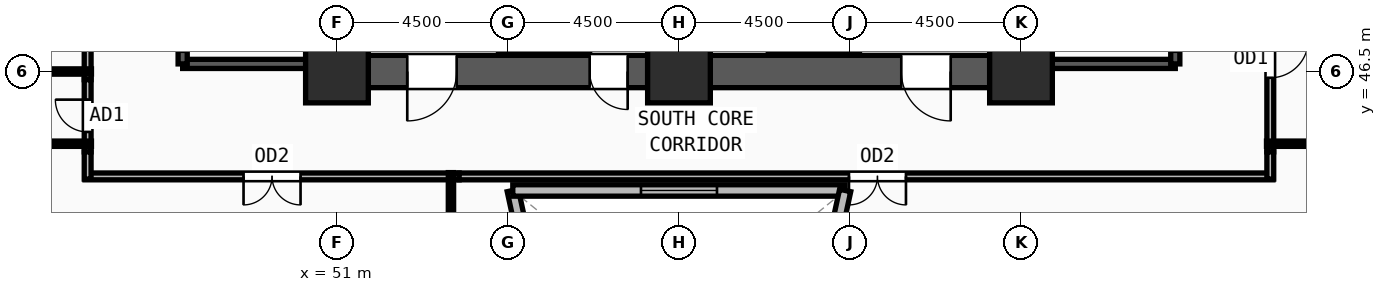
"""IFC4 building model, lengths in metres.
Left out: names, types, materials, properties, quantities, classifications, styles, units other than length and angle.
Written with IfcOpenShell. Run it as: python <this file> out.ifc"""

import sys

from ifc_helpers import new_model, si_unit, direction, frame, frame_2d, origin, origin_2d, place, context, subcontext, project, spatial, rectangle, extrude, source, transform, mapped, element, fill, save


model = new_model("IFC4")
c1 = context("Model", 3, precision=1e-05, world=origin(), true_north=direction((0.0, 1.0)))
c2 = subcontext(c1, "Body", "Model", "MODEL_VIEW")
j1 = project(units=[si_unit("LENGTHUNIT", "METRE"), si_unit("PLANEANGLEUNIT", "RADIAN")], contexts=[c1])
p1 = place(None, origin())
s1 = spatial("IfcSite", under=j1, at=p1, CompositionType="ELEMENT")
p2 = place(p1, origin())
s2 = spatial("IfcBuilding", under=s1, at=p2, CompositionType="ELEMENT")
p3 = place(p2, frame((0.0, 0.0, 39.75)))
s3 = spatial("IfcBuildingStorey", under=s2, at=p3, CompositionType="ELEMENT", Elevation=39.75)
m1 = source(origin(), c2, "Body", "SweptSolid", [
    extrude(rectangle(XDim=1.65, YDim=1.65, at=origin_2d()), origin(), (0.0, 0.0, 1.0), 3.75),
])
for number, where, z_axis, x_axis in (
    (1, (51.0, 46.5, 0.0), (0.0, 0.0, 1.0), (1.0, 0.0, 0.0)),
    (2, (60.0, 46.5, 0.0), (0.0, 0.0, 1.0), (1.0, 0.0, 0.0)),
    (3, (69.0, 46.5, 0.0), (0.0, 0.0, 1.0), (1.0, 0.0, 0.0)),
):
    element("IfcColumn", number, at=place(p3, frame(where, z_axis=z_axis, x_axis=x_axis)), inside=s3, PredefinedType="COLUMN", context=c2, shape_type="MappedRepresentation", body=[
        mapped(m1, transform((0.0, 0.0, 0.0), x_axis=(1.0, 0.0, 0.0), y_axis=(0.0, 1.0, 0.0), z_axis=(0.0, 0.0, 1.0), scale=1.0)),
    ])
p4 = place(p3, frame((68.175, 46.5, 0.0), z_axis=(0.0, 0.0, 1.0), x_axis=(-1.0, 0.0, 0.0)))
e4 = element("IfcWall", 4, at=p4, inside=s3, PredefinedType="SHEAR", context=c2, shape_type="SweptSolid", body=[
    extrude(rectangle(XDim=7.35, YDim=0.85, at=frame_2d((3.675, 0.0))), origin(), (0.0, 0.0, 1.0), 3.57),
])
m2 = source(origin(), c2, "Body", "SweptSolid", [
    extrude(rectangle(XDim=1.3, YDim=2.2, at=frame_2d((0.65, 1.1))), frame((0.0, 0.435, 0.0), z_axis=(0.0, -1.0, 0.0), x_axis=(1.0, 0.0, 0.0)), (0.0, 0.0, 1.0), 0.87),
])
p5 = place(p4, frame((1.025, 0.0, 0.0)))
e5 = element("IfcOpeningElement", 5, at=p5, cuts=e4, PredefinedType="OPENING", context=c2, shape_type="MappedRepresentation", body=[
    mapped(m2, transform((0.0, 0.0, 0.0), x_axis=(1.0, 0.0, 0.0), y_axis=(0.0, 1.0, 0.0), z_axis=(0.0, 0.0, 1.0), scale=1.0)),
])
p6 = place(p3, frame((59.175, 46.5, 0.0), z_axis=(0.0, 0.0, 1.0), x_axis=(-1.0, 0.0, 0.0)))
e6 = element("IfcWall", 6, at=p6, inside=s3, PredefinedType="SHEAR", context=c2, shape_type="SweptSolid", body=[
    extrude(rectangle(XDim=7.35, YDim=0.85, at=frame_2d((3.675, 0.0))), origin(), (0.0, 0.0, 1.0), 3.57),
])
p7 = place(p6, frame((5.025, 0.0, 0.0)))
e7 = element("IfcOpeningElement", 7, at=p7, cuts=e6, PredefinedType="OPENING", context=c2, shape_type="MappedRepresentation", body=[
    mapped(m2, transform((0.0, 0.0, 0.0), x_axis=(1.0, 0.0, 0.0), y_axis=(0.0, 1.0, 0.0), z_axis=(0.0, 0.0, 1.0), scale=1.0)),
])
m3 = source(origin(), c2, "Body", "SweptSolid", [
    extrude(rectangle(XDim=1.0, YDim=2.2, at=frame_2d((0.5, 1.1))), frame((0.0, 0.435, 0.0), z_axis=(0.0, -1.0, 0.0), x_axis=(1.0, 0.0, 0.0)), (0.0, 0.0, 1.0), 0.87),
])
p8 = place(p6, frame((0.525, 0.0, 0.0)))
e8 = element("IfcOpeningElement", 8, at=p8, cuts=e6, PredefinedType="OPENING", context=c2, shape_type="MappedRepresentation", body=[
    mapped(m3, transform((0.0, 0.0, 0.0), x_axis=(1.0, 0.0, 0.0), y_axis=(0.0, 1.0, 0.0), z_axis=(0.0, 0.0, 1.0), scale=1.0)),
])
p9 = place(p3, frame((46.94, 46.7, 0.0), z_axis=(0.0, 0.0, 1.0), x_axis=(1.0, 0.0, 0.0)))
e9 = element("IfcWall", 9, at=p9, inside=s3, PredefinedType="SOLIDWALL", context=c2, shape_type="SweptSolid", body=[
    extrude(rectangle(XDim=3.44, YDim=0.24, at=frame_2d((1.72, 0.0))), origin(), (0.0, 0.0, 1.0), 3.57),
])
p10 = place(p3, frame((50.38, 46.7, 0.0), z_axis=(0.0, 0.0, 1.0), x_axis=(0.0, 1.0, 0.0)))
e10 = element("IfcWall", 10, at=p10, inside=s3, PredefinedType="SOLIDWALL", context=c2, shape_type="SweptSolid", body=[
    extrude(rectangle(XDim=7.82, YDim=0.24, at=frame_2d((3.91, 0.0))), origin(), (0.0, 0.0, 1.0), 3.57),
])
p11 = place(p3, frame((46.94, 54.52, 0.0), z_axis=(0.0, 0.0, 1.0), x_axis=(0.0, -1.0, 0.0)))
e11 = element("IfcWall", 11, at=p11, inside=s3, PredefinedType="SOLIDWALL", context=c2, shape_type="SweptSolid", body=[
    extrude(rectangle(XDim=7.82, YDim=0.24, at=frame_2d((3.91, 0.0))), origin(), (0.0, 0.0, 1.0), 3.57),
])
m4 = source(origin(), c2, "Body", "SweptSolid", [
    extrude(rectangle(XDim=1.2, YDim=2.2, at=frame_2d((0.6, 1.1))), frame((0.0, 0.13, 0.0), z_axis=(0.0, -1.0, 0.0), x_axis=(1.0, 0.0, 0.0)), (0.0, 0.0, 1.0), 0.26),
])
p12 = place(p11, frame((6.3, 0.0, 0.0)))
e12 = element("IfcOpeningElement", 12, at=p12, cuts=e11, PredefinedType="OPENING", context=c2, shape_type="MappedRepresentation", body=[
    mapped(m4, transform((0.0, 0.0, 0.0), x_axis=(1.0, 0.0, 0.0), y_axis=(0.0, 1.0, 0.0), z_axis=(0.0, 0.0, 1.0), scale=1.0)),
])
p13 = place(p3, frame((69.62, 46.7, 0.0), z_axis=(0.0, 0.0, 1.0), x_axis=(1.0, 0.0, 0.0)))
e13 = element("IfcWall", 13, at=p13, inside=s3, PredefinedType="SOLIDWALL", context=c2, shape_type="SweptSolid", body=[
    extrude(rectangle(XDim=3.44, YDim=0.24, at=frame_2d((1.72, 0.0))), origin(), (0.0, 0.0, 1.0), 3.57),
])
p14 = place(p3, frame((73.06, 46.7, 0.0), z_axis=(0.0, 0.0, 1.0), x_axis=(0.0, 1.0, 0.0)))
e14 = element("IfcWall", 14, at=p14, inside=s3, PredefinedType="SOLIDWALL", context=c2, shape_type="SweptSolid", body=[
    extrude(rectangle(XDim=7.82, YDim=0.24, at=frame_2d((3.91, 0.0))), origin(), (0.0, 0.0, 1.0), 3.57),
])
p15 = place(p14, frame((0.32, 0.0, 0.0)))
e15 = element("IfcOpeningElement", 15, at=p15, cuts=e14, PredefinedType="OPENING", context=c2, shape_type="MappedRepresentation", body=[
    mapped(m4, transform((0.0, 0.0, 0.0), x_axis=(1.0, 0.0, 0.0), y_axis=(0.0, 1.0, 0.0), z_axis=(0.0, 0.0, 1.0), scale=1.0)),
])
p16 = place(p3, frame((69.62, 54.52, 0.0), z_axis=(0.0, 0.0, 1.0), x_axis=(0.0, -1.0, 0.0)))
e16 = element("IfcWall", 16, at=p16, inside=s3, PredefinedType="SOLIDWALL", context=c2, shape_type="SweptSolid", body=[
    extrude(rectangle(XDim=7.82, YDim=0.24, at=frame_2d((3.91, 0.0))), origin(), (0.0, 0.0, 1.0), 3.57),
])
p17 = place(p3, frame((57.158, 36.291, 0.0), z_axis=(0.0, 0.0, 1.0), x_axis=(-0.211384142555, 0.977403061319, 0.0)))
e17 = element("IfcWall", 17, at=p17, inside=s3, PredefinedType="SOLIDWALL", context=c2, shape_type="SweptSolid", body=[
    extrude(rectangle(XDim=7.243, YDim=0.3, at=frame_2d((3.621, 0.0))), origin(), (0.0, 0.0, 1.0), 3.57),
])
m5 = source(origin(), c2, "Body", "SweptSolid", [
    extrude(rectangle(XDim=2.0, YDim=1.9, at=frame_2d((1.0, 0.95))), frame((0.0, 0.16, 0.0), z_axis=(0.0, -1.0, 0.0), x_axis=(1.0, 0.0, 0.0)), (0.0, 0.0, 1.0), 0.32),
])
p18 = place(p17, frame((2.621, 0.0, 0.55)))
e18 = element("IfcOpeningElement", 18, at=p18, cuts=e17, PredefinedType="OPENING", context=c2, shape_type="MappedRepresentation", body=[
    mapped(m5, transform((0.0, 0.0, 0.0), x_axis=(1.0, 0.0, 0.0), y_axis=(0.0, 1.0, 0.0), z_axis=(0.0, 0.0, 1.0), scale=1.0)),
])
p19 = place(p3, frame((55.627, 43.37, 0.0), z_axis=(0.0, 0.0, 1.0), x_axis=(1.0, 0.0, 0.0)))
e19 = element("IfcWall", 19, at=p19, inside=s3, PredefinedType="SOLIDWALL", context=c2, shape_type="SweptSolid", body=[
    extrude(rectangle(XDim=8.746, YDim=0.3, at=frame_2d((4.373, 0.0))), origin(), (0.0, 0.0, 1.0), 3.57),
])
p20 = place(p19, frame((3.373, 0.0, 0.55)))
e20 = element("IfcOpeningElement", 20, at=p20, cuts=e19, PredefinedType="OPENING", context=c2, shape_type="MappedRepresentation", body=[
    mapped(m5, transform((0.0, 0.0, 0.0), x_axis=(1.0, 0.0, 0.0), y_axis=(0.0, 1.0, 0.0), z_axis=(0.0, 0.0, 1.0), scale=1.0)),
])
p21 = place(p3, frame((64.373, 43.37, 0.0), z_axis=(0.0, 0.0, 1.0), x_axis=(-0.211384142555, -0.977403061319, 0.0)))
e21 = element("IfcWall", 21, at=p21, inside=s3, PredefinedType="SOLIDWALL", context=c2, shape_type="SweptSolid", body=[
    extrude(rectangle(XDim=7.243, YDim=0.3, at=frame_2d((3.621, 0.0))), origin(), (0.0, 0.0, 1.0), 3.57),
])
p22 = place(p21, frame((2.621, 0.0, 0.55)))
e22 = element("IfcOpeningElement", 22, at=p22, cuts=e21, PredefinedType="OPENING", context=c2, shape_type="MappedRepresentation", body=[
    mapped(m5, transform((0.0, 0.0, 0.0), x_axis=(1.0, 0.0, 0.0), y_axis=(0.0, 1.0, 0.0), z_axis=(0.0, 0.0, 1.0), scale=1.0)),
])
p23 = place(p3, frame((44.44, 46.285, 0.0), z_axis=(0.0, 0.0, 1.0), x_axis=(0.0, 1.0, 0.0)))
e23 = element("IfcWall", 23, at=p23, inside=s3, PredefinedType="PARTITIONING", context=c2, shape_type="SweptSolid", body=[
    extrude(rectangle(XDim=8.5, YDim=0.18, at=frame_2d((4.25, 0.0))), origin(), (0.0, 0.0, 1.0), 3.57),
])
m6 = source(origin(), c2, "Body", "SweptSolid", [
    extrude(rectangle(XDim=1.5, YDim=2.2, at=frame_2d((0.75, 1.1))), frame((0.0, 0.1, 0.0), z_axis=(0.0, -1.0, 0.0), x_axis=(1.0, 0.0, 0.0)), (0.0, 0.0, 1.0), 0.2),
])
p24 = place(p23, frame((3.5, 0.0, 0.0)))
e24 = element("IfcOpeningElement", 24, at=p24, cuts=e23, PredefinedType="OPENING", context=c2, shape_type="MappedRepresentation", body=[
    mapped(m6, transform((0.0, 0.0, 0.0), x_axis=(1.0, 0.0, 0.0), y_axis=(0.0, 1.0, 0.0), z_axis=(0.0, 0.0, 1.0), scale=1.0)),
])
p25 = place(p3, frame((44.44, 44.385, 0.0), z_axis=(0.0, 0.0, 1.0), x_axis=(0.0, 1.0, 0.0)))
e25 = element("IfcWall", 25, at=p25, inside=s3, PredefinedType="PARTITIONING", context=c2, shape_type="SweptSolid", body=[
    extrude(rectangle(XDim=1.9, YDim=0.18, at=frame_2d((0.95, 0.0))), origin(), (0.0, 0.0, 1.0), 3.57),
])
m7 = source(origin(), c2, "Body", "SweptSolid", [
    extrude(rectangle(XDim=0.85, YDim=2.1, at=frame_2d((0.425, 1.05))), frame((0.0, 0.1, 0.0), z_axis=(0.0, -1.0, 0.0), x_axis=(1.0, 0.0, 0.0)), (0.0, 0.0, 1.0), 0.2),
])
p26 = place(p25, frame((0.525, 0.0, 0.0)))
e26 = element("IfcOpeningElement", 26, at=p26, cuts=e25, PredefinedType="OPENING", context=c2, shape_type="MappedRepresentation", body=[
    mapped(m7, transform((0.0, 0.0, 0.0), x_axis=(1.0, 0.0, 0.0), y_axis=(0.0, 1.0, 0.0), z_axis=(0.0, 0.0, 1.0), scale=1.0)),
])
p27 = place(p3, frame((54.215, 43.74, 0.0), z_axis=(0.0, 0.0, 1.0), x_axis=(-1.0, 0.0, 0.0)))
e27 = element("IfcWall", 27, at=p27, inside=s3, PredefinedType="PARTITIONING", context=c2, shape_type="SweptSolid", body=[
    extrude(rectangle(XDim=9.845, YDim=0.18, at=frame_2d((4.922, 0.0))), origin(), (0.0, 0.0, 1.0), 3.57),
])
p28 = place(p27, frame((4.173, 0.0, 0.0)))
e28 = element("IfcOpeningElement", 28, at=p28, cuts=e27, PredefinedType="OPENING", context=c2, shape_type="MappedRepresentation", body=[
    mapped(m6, transform((0.0, 0.0, 0.0), x_axis=(1.0, 0.0, 0.0), y_axis=(0.0, 1.0, 0.0), z_axis=(0.0, 0.0, 1.0), scale=1.0)),
])
p29 = place(p3, frame((75.63, 43.74, 0.0), z_axis=(0.0, 0.0, 1.0), x_axis=(-1.0, 0.0, 0.0)))
e29 = element("IfcWall", 29, at=p29, inside=s3, PredefinedType="PARTITIONING", context=c2, shape_type="SweptSolid", body=[
    extrude(rectangle(XDim=21.415, YDim=0.18, at=frame_2d((10.708, 0.0))), origin(), (0.0, 0.0, 1.0), 3.57),
])
p30 = place(p29, frame((9.657, 0.0, 0.0)))
e30 = element("IfcOpeningElement", 30, at=p30, cuts=e29, PredefinedType="OPENING", context=c2, shape_type="MappedRepresentation", body=[
    mapped(m6, transform((0.0, 0.0, 0.0), x_axis=(1.0, 0.0, 0.0), y_axis=(0.0, 1.0, 0.0), z_axis=(0.0, 0.0, 1.0), scale=1.0)),
])
p31 = place(p3, frame((75.56, 49.285, 0.0), z_axis=(0.0, 0.0, 1.0), x_axis=(0.0, -1.0, 0.0)))
e31 = element("IfcWall", 31, at=p31, inside=s3, PredefinedType="PARTITIONING", context=c2, shape_type="SweptSolid", body=[
    extrude(rectangle(XDim=4.9, YDim=0.18, at=frame_2d((2.45, 0.0))), origin(), (0.0, 0.0, 1.0), 3.57),
])
m8 = source(origin(), c2, "Body", "SweptSolid", [
    extrude(rectangle(XDim=1.0, YDim=2.2, at=frame_2d((0.5, 1.1))), frame((0.0, 0.1, 0.0), z_axis=(0.0, -1.0, 0.0), x_axis=(1.0, 0.0, 0.0)), (0.0, 0.0, 1.0), 0.2),
])
p32 = place(p31, frame((1.95, 0.0, 0.0)))
e32 = element("IfcOpeningElement", 32, at=p32, cuts=e31, PredefinedType="OPENING", context=c2, shape_type="MappedRepresentation", body=[
    mapped(m8, transform((0.0, 0.0, 0.0), x_axis=(1.0, 0.0, 0.0), y_axis=(0.0, 1.0, 0.0), z_axis=(0.0, 0.0, 1.0), scale=1.0)),
])
for number, where, z_axis, x_axis in (
    (33, (44.44, 43.67, 0.0), (0.0, 0.0, 1.0), (0.0, 1.0, 0.0)),
    (34, (75.56, 44.385, 0.0), (0.0, 0.0, 1.0), (0.0, -1.0, 0.0)),
):
    element("IfcWall", number, at=place(p3, frame(where, z_axis=z_axis, x_axis=x_axis)), inside=s3, PredefinedType="PARTITIONING", context=c2, shape_type="SweptSolid", body=[
        extrude(rectangle(XDim=0.715, YDim=0.18, at=frame_2d((0.357, 0.0))), origin(), (0.0, 0.0, 1.0), 3.57),
    ])
p33 = place(p3, frame((44.54, 44.6, 0.0), z_axis=(0.0, 0.0, 1.0), x_axis=(-1.0, 0.0, 0.0)))
e35 = element("IfcWall", 35, at=p33, inside=s3, PredefinedType="PARTITIONING", context=c2, shape_type="SweptSolid", body=[
    extrude(rectangle(XDim=11.76, YDim=0.14, at=frame_2d((5.88, 0.0))), origin(), (0.0, 0.0, 1.0), 3.57),
])
p34 = place(p3, frame((44.54, 46.5, 0.0), z_axis=(0.0, 0.0, 1.0), x_axis=(-1.0, 0.0, 0.0)))
e36 = element("IfcWall", 36, at=p34, inside=s3, PredefinedType="PARTITIONING", context=c2, shape_type="SweptSolid", body=[
    extrude(rectangle(XDim=12.72, YDim=0.14, at=frame_2d((6.36, 0.0))), origin(), (0.0, 0.0, 1.0), 3.57),
])
p35 = place(p3, frame((75.46, 44.6, 0.0), z_axis=(0.0, 0.0, 1.0), x_axis=(1.0, 0.0, 0.0)))
e37 = element("IfcWall", 37, at=p35, inside=s3, PredefinedType="PARTITIONING", context=c2, shape_type="SweptSolid", body=[
    extrude(rectangle(XDim=12.098, YDim=0.14, at=frame_2d((6.049, 0.0))), origin(), (0.0, 0.0, 1.0), 2.705),
])
p36 = place(p3, frame((54.0, 43.84, 0.0), z_axis=(0.0, 0.0, 1.0), x_axis=(0.0, -1.0, 0.0)))
e38 = element("IfcWall", 38, at=p36, inside=s3, PredefinedType="PARTITIONING", context=c2, shape_type="SweptSolid", body=[
    extrude(rectangle(XDim=31.613, YDim=0.14, at=frame_2d((15.807, 0.0))), origin(), (0.0, 0.0, 1.0), 3.57),
])
m9 = source(origin(), c2, "Body", "SweptSolid", [
    extrude(rectangle(XDim=1.3, YDim=2.2, at=frame_2d((0.65, 1.1))), frame((0.0, 0.025, 0.0), z_axis=(0.0, -1.0, 0.0), x_axis=(1.0, 0.0, 0.0)), (0.0, 0.0, 1.0), 0.05),
])
p37 = place(p7, origin())
e39 = element("IfcDoor", 39, at=p37, inside=s3, OperationType="SINGLE_SWING_RIGHT", PredefinedType="DOOR", context=c2, shape_type="MappedRepresentation", body=[
    mapped(m9, transform((0.0, 0.0, 0.0), x_axis=(1.0, 0.0, 0.0), y_axis=(0.0, 1.0, 0.0), z_axis=(0.0, 0.0, 1.0), scale=1.0)),
])
fill(e7, e39)
m10 = source(origin(), c2, "Body", "SweptSolid", [
    extrude(rectangle(XDim=1.0, YDim=2.2, at=frame_2d((0.5, 1.1))), frame((0.0, 0.025, 0.0), z_axis=(0.0, -1.0, 0.0), x_axis=(1.0, 0.0, 0.0)), (0.0, 0.0, 1.0), 0.05),
])
p38 = place(p8, origin())
e40 = element("IfcDoor", 40, at=p38, inside=s3, OperationType="SINGLE_SWING_LEFT", PredefinedType="DOOR", context=c2, shape_type="MappedRepresentation", body=[
    mapped(m10, transform((0.0, 0.0, 0.0), x_axis=(1.0, 0.0, 0.0), y_axis=(0.0, 1.0, 0.0), z_axis=(0.0, 0.0, 1.0), scale=1.0)),
])
fill(e8, e40)
p39 = place(p5, origin())
e41 = element("IfcDoor", 41, at=p39, inside=s3, OperationType="SINGLE_SWING_LEFT", PredefinedType="DOOR", context=c2, shape_type="MappedRepresentation", body=[
    mapped(m9, transform((0.0, 0.0, 0.0), x_axis=(1.0, 0.0, 0.0), y_axis=(0.0, 1.0, 0.0), z_axis=(0.0, 0.0, 1.0), scale=1.0)),
])
fill(e5, e41)
m11 = source(origin(), c2, "Body", "SweptSolid", [
    extrude(rectangle(XDim=2.0, YDim=1.9, at=frame_2d((1.0, 0.95))), frame((0.0, 0.03, 0.0), z_axis=(0.0, -1.0, 0.0), x_axis=(1.0, 0.0, 0.0)), (0.0, 0.0, 1.0), 0.06),
])
p40 = place(p20, origin())
e42 = element("IfcWindow", 42, at=p40, inside=s3, PartitioningType="DOUBLE_PANEL_VERTICAL", PredefinedType="WINDOW", context=c2, shape_type="MappedRepresentation", body=[
    mapped(m11, transform((0.0, 0.0, 0.0), x_axis=(1.0, 0.0, 0.0), y_axis=(0.0, 1.0, 0.0), z_axis=(0.0, 0.0, 1.0), scale=1.0)),
])
fill(e20, e42)
m12 = source(origin(), c2, "Body", "SweptSolid", [
    extrude(rectangle(XDim=0.85, YDim=2.1, at=frame_2d((0.425, 1.05))), frame((0.0, 0.025, 0.0), z_axis=(0.0, -1.0, 0.0), x_axis=(1.0, 0.0, 0.0)), (0.0, 0.0, 1.0), 0.05),
])
p41 = place(p26, origin())
e43 = element("IfcDoor", 43, at=p41, inside=s3, OperationType="SINGLE_SWING_RIGHT", PredefinedType="DOOR", context=c2, shape_type="MappedRepresentation", body=[
    mapped(m12, transform((0.0, 0.0, 0.0), x_axis=(1.0, 0.0, 0.0), y_axis=(0.0, 1.0, 0.0), z_axis=(0.0, 0.0, 1.0), scale=1.0)),
])
fill(e26, e43)
m13 = source(origin(), c2, "Body", "SweptSolid", [
    extrude(rectangle(XDim=1.5, YDim=2.2, at=frame_2d((0.75, 1.1))), frame((0.0, 0.025, 0.0), z_axis=(0.0, -1.0, 0.0), x_axis=(1.0, 0.0, 0.0)), (0.0, 0.0, 1.0), 0.05),
])
p42 = place(p28, origin())
e44 = element("IfcDoor", 44, at=p42, inside=s3, OperationType="DOUBLE_DOOR_SINGLE_SWING", PredefinedType="DOOR", context=c2, shape_type="MappedRepresentation", body=[
    mapped(m13, transform((0.0, 0.0, 0.0), x_axis=(1.0, 0.0, 0.0), y_axis=(0.0, 1.0, 0.0), z_axis=(0.0, 0.0, 1.0), scale=1.0)),
])
fill(e28, e44)
p43 = place(p30, origin())
e45 = element("IfcDoor", 45, at=p43, inside=s3, OperationType="DOUBLE_DOOR_SINGLE_SWING", PredefinedType="DOOR", context=c2, shape_type="MappedRepresentation", body=[
    mapped(m13, transform((0.0, 0.0, 0.0), x_axis=(1.0, 0.0, 0.0), y_axis=(0.0, 1.0, 0.0), z_axis=(0.0, 0.0, 1.0), scale=1.0)),
])
fill(e30, e45)
p44 = place(p32, origin())
e46 = element("IfcDoor", 46, at=p44, inside=s3, OperationType="SINGLE_SWING_LEFT", PredefinedType="DOOR", context=c2, shape_type="MappedRepresentation", body=[
    mapped(m10, transform((0.0, 0.0, 0.0), x_axis=(1.0, 0.0, 0.0), y_axis=(0.0, 1.0, 0.0), z_axis=(0.0, 0.0, 1.0), scale=1.0)),
])
fill(e32, e46)
save(model, sys.argv[1])
